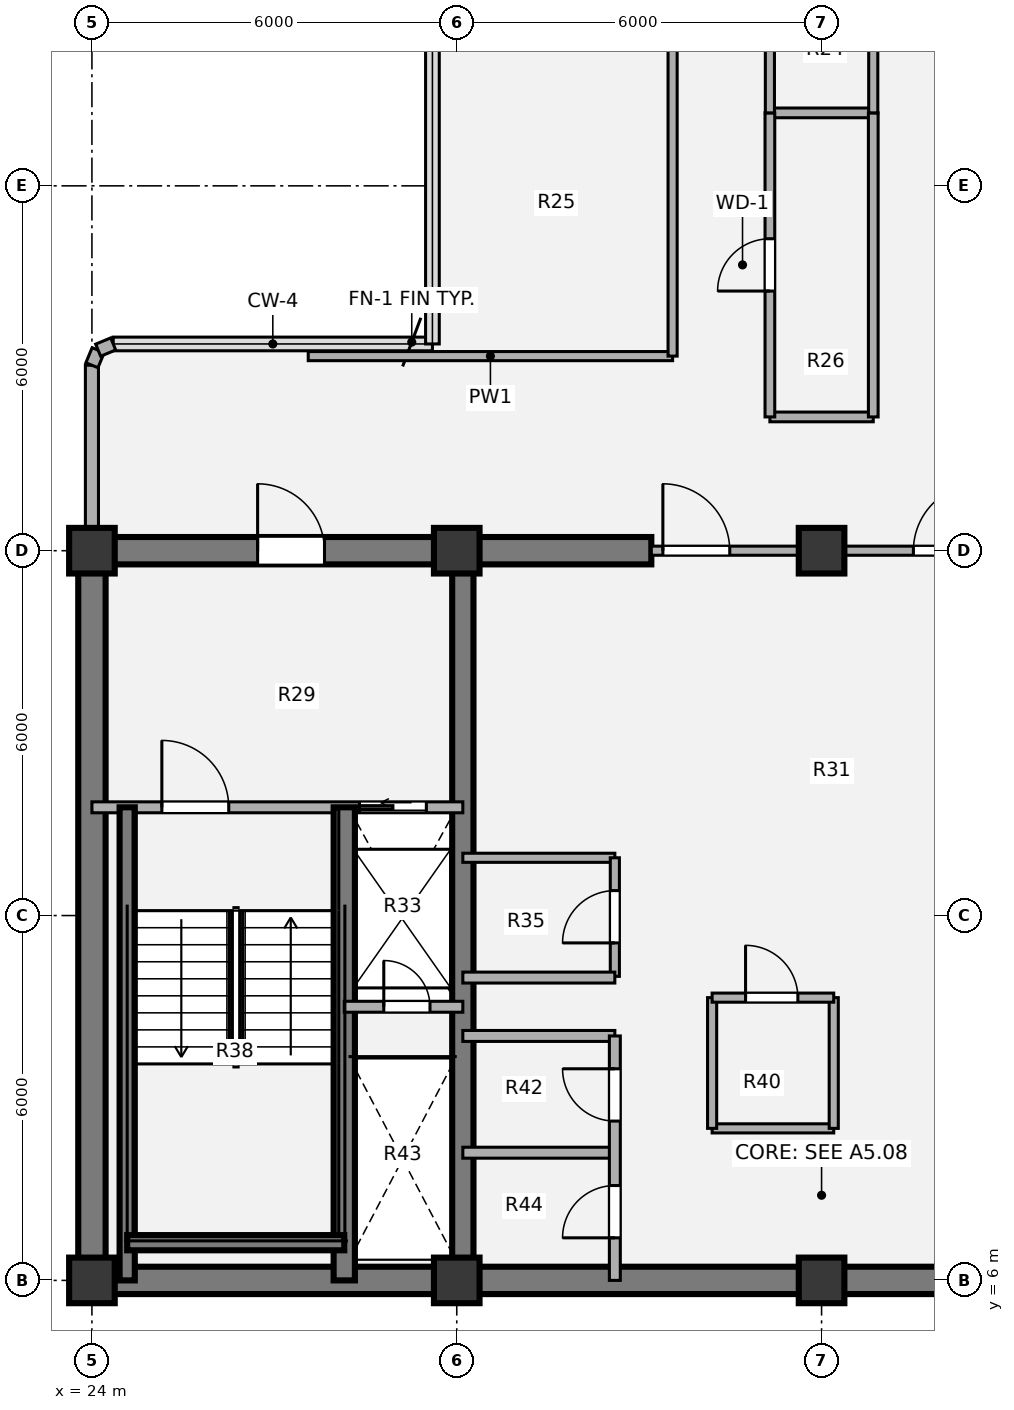
"""IFC4 building model, lengths in metres.
Left out: names, types, materials, properties, quantities, classifications, styles, units other than length and angle.
Written with IfcOpenShell. Run it as: python <this file> out.ifc"""

import sys

from ifc_helpers import new_model, si_unit, direction, frame, frame_2d, origin, origin_2d, place, context, subcontext, project, spatial, rectangle, extrude, source, transform, mapped, element, fill, save


model = new_model("IFC4")
c1 = context("Model", 3, precision=1e-05, world=origin(), true_north=direction((0.0, 1.0)))
c2 = subcontext(c1, "Body", "Model", "MODEL_VIEW")
j1 = project(units=[si_unit("LENGTHUNIT", "METRE"), si_unit("PLANEANGLEUNIT", "RADIAN")], contexts=[c1])
p1 = place(None, origin())
s1 = spatial("IfcSite", under=j1, at=p1, CompositionType="ELEMENT")
p2 = place(p1, origin())
s2 = spatial("IfcBuilding", under=s1, at=p2, CompositionType="ELEMENT")
p3 = place(p2, frame((0.0, 0.0, 194.22)))
s3 = spatial("IfcBuildingStorey", under=s2, at=p3, CompositionType="ELEMENT", Elevation=194.22)
m1 = source(origin(), c2, "Body", "SweptSolid", [
    extrude(rectangle(XDim=0.75, YDim=0.75, at=origin_2d()), origin(), (0.0, 0.0, 1.0), 3.78),
])
for number, where, z_axis, x_axis in (
    (1, (24.0, 6.0, 0.0), (0.0, 0.0, 1.0), (1.0, 0.0, 0.0)),
    (2, (30.0, 6.0, 0.0), (0.0, 0.0, 1.0), (1.0, 0.0, 0.0)),
    (3, (36.0, 6.0, 0.0), (0.0, 0.0, 1.0), (1.0, 0.0, 0.0)),
    (4, (24.0, 18.0, 0.0), (0.0, 0.0, 1.0), (1.0, 0.0, 0.0)),
    (5, (30.0, 18.0, 0.0), (0.0, 0.0, 1.0), (1.0, 0.0, 0.0)),
    (6, (36.0, 18.0, 0.0), (0.0, 0.0, 1.0), (1.0, 0.0, 0.0)),
):
    element("IfcColumn", number, at=place(p3, frame(where, z_axis=z_axis, x_axis=x_axis)), inside=s3, PredefinedType="COLUMN", context=c2, shape_type="MappedRepresentation", body=[
        mapped(m1, transform((0.0, 0.0, 0.0), x_axis=(1.0, 0.0, 0.0), y_axis=(0.0, 1.0, 0.0), z_axis=(0.0, 0.0, 1.0), scale=1.0)),
    ])
p4 = place(p3, frame((48.225, 6.0, 0.0), z_axis=(0.0, 0.0, 1.0), x_axis=(-1.0, 0.0, 0.0)))
e7 = element("IfcWall", 7, at=p4, inside=s3, PredefinedType="SHEAR", context=c2, shape_type="SweptSolid", body=[
    extrude(rectangle(XDim=24.45, YDim=0.45, at=frame_2d((12.225, 0.0))), origin(), (0.0, 0.0, 1.0), 3.78),
])
p5 = place(p3, frame((24.0, 6.0, 0.0), z_axis=(0.0, 0.0, 1.0), x_axis=(0.0, 1.0, 0.0)))
e8 = element("IfcWall", 8, at=p5, inside=s3, PredefinedType="SHEAR", context=c2, shape_type="SweptSolid", body=[
    extrude(rectangle(XDim=12.0, YDim=0.45, at=frame_2d((6.0, 0.0))), origin(), (0.0, 0.0, 1.0), 3.78),
])
p6 = place(p3, frame((23.775, 18.0, 0.0), z_axis=(0.0, 0.0, 1.0), x_axis=(1.0, 0.0, 0.0)))
e9 = element("IfcWall", 9, at=p6, inside=s3, PredefinedType="SHEAR", context=c2, shape_type="SweptSolid", body=[
    extrude(rectangle(XDim=9.425, YDim=0.45, at=frame_2d((4.712, 0.0))), origin(), (0.0, 0.0, 1.0), 3.78),
])
p7 = place(p6, frame((2.95, 0.0, 0.0)))
e10 = element("IfcOpeningElement", 10, at=p7, cuts=e9, PredefinedType="OPENING", context=c2, shape_type="SweptSolid", body=[
    extrude(rectangle(XDim=1.1, YDim=2.1, at=origin_2d()), frame((0.55, 0.235, 1.05), z_axis=(0.0, -1.0, 0.0), x_axis=(1.0, 0.0, 0.0)), (0.0, 0.0, 1.0), 0.47),
])
p8 = place(p3, frame((30.1, 6.0, 0.0), z_axis=(0.0, 0.0, 1.0), x_axis=(0.0, 1.0, 0.0)))
e11 = element("IfcWall", 11, at=p8, inside=s3, PredefinedType="SHEAR", context=c2, shape_type="SweptSolid", body=[
    extrude(rectangle(XDim=12.0, YDim=0.35, at=frame_2d((6.0, 0.0))), origin(), (0.0, 0.0, 1.0), 3.78),
])
p9 = place(p3, frame((24.0, 18.355, 0.0), z_axis=(0.0, 0.0, 1.0), x_axis=(0.0, 1.0, 0.0)))
e12 = element("IfcWall", 12, at=p9, inside=s3, PredefinedType="SOLIDWALL", context=c2, shape_type="SweptSolid", body=[
    extrude(rectangle(XDim=2.695, YDim=0.215, at=frame_2d((1.348, 0.0))), origin(), (0.0, 0.0, 1.0), 2.718),
])
p10 = place(p3, frame((24.0, 21.05, 0.0), z_axis=(0.0, 0.0, 1.0), x_axis=(0.382673670509, 0.923883575944, 0.0)))
e13 = element("IfcWall", 13, at=p10, inside=s3, PredefinedType="SOLIDWALL", context=c2, shape_type="SweptSolid", body=[
    extrude(rectangle(XDim=0.268, YDim=0.215, at=frame_2d((0.134, 0.0))), origin(), (0.0, 0.0, 1.0), 3.53),
])
p11 = place(p3, frame((24.103, 21.298, 0.0), z_axis=(0.0, 0.0, 1.0), x_axis=(0.924205486139, 0.381895560841, 0.0)))
e14 = element("IfcWall", 14, at=p11, inside=s3, PredefinedType="SOLIDWALL", context=c2, shape_type="SweptSolid", body=[
    extrude(rectangle(XDim=0.268, YDim=0.215, at=frame_2d((0.134, 0.0))), origin(), (0.0, 0.0, 1.0), 3.53),
])
p12 = place(p3, frame((30.1, 12.95, 0.0), z_axis=(0.0, 0.0, 1.0), x_axis=(1.0, 0.0, 0.0)))
e15 = element("IfcWall", 15, at=p12, inside=s3, PredefinedType="PARTITIONING", context=c2, shape_type="SweptSolid", body=[
    extrude(rectangle(XDim=2.5, YDim=0.15, at=frame_2d((1.25, 0.0))), origin(), (0.0, 0.0, 1.0), 3.5),
])
p13 = place(p3, frame((32.6, 11.0, 0.0), z_axis=(0.0, 0.0, 1.0), x_axis=(0.0, 1.0, 0.0)))
e16 = element("IfcWall", 16, at=p13, inside=s3, PredefinedType="PARTITIONING", context=c2, shape_type="SweptSolid", body=[
    extrude(rectangle(XDim=1.95, YDim=0.15, at=frame_2d((0.975, 0.0))), origin(), (0.0, 0.0, 1.0), 3.5),
])
p14 = place(p13, frame((0.55, 0.0, 0.0)))
e17 = element("IfcOpeningElement", 17, at=p14, cuts=e16, PredefinedType="OPENING", context=c2, shape_type="SweptSolid", body=[
    extrude(rectangle(XDim=0.86, YDim=2.1, at=origin_2d()), frame((0.43, 0.085, 1.05), z_axis=(0.0, -1.0, 0.0), x_axis=(1.0, 0.0, 0.0)), (0.0, 0.0, 1.0), 0.17),
])
p15 = place(p3, frame((34.2, 8.5, 0.0), z_axis=(0.0, 0.0, 1.0), x_axis=(1.0, 0.0, 0.0)))
e18 = element("IfcWall", 18, at=p15, inside=s3, PredefinedType="PARTITIONING", context=c2, shape_type="SweptSolid", body=[
    extrude(rectangle(XDim=2.0, YDim=0.15, at=frame_2d((1.0, 0.0))), origin(), (0.0, 0.0, 1.0), 3.5),
])
p16 = place(p3, frame((34.2, 8.5, 0.0), z_axis=(0.0, 0.0, 1.0), x_axis=(0.0, 1.0, 0.0)))
e19 = element("IfcWall", 19, at=p16, inside=s3, PredefinedType="PARTITIONING", context=c2, shape_type="SweptSolid", body=[
    extrude(rectangle(XDim=2.15, YDim=0.15, at=frame_2d((1.075, 0.0))), origin(), (0.0, 0.0, 1.0), 3.5),
])
p17 = place(p3, frame((36.2, 8.5, 0.0), z_axis=(0.0, 0.0, 1.0), x_axis=(0.0, 1.0, 0.0)))
e20 = element("IfcWall", 20, at=p17, inside=s3, PredefinedType="PARTITIONING", context=c2, shape_type="SweptSolid", body=[
    extrude(rectangle(XDim=2.15, YDim=0.15, at=frame_2d((1.075, 0.0))), origin(), (0.0, 0.0, 1.0), 2.715),
])
p18 = place(p3, frame((34.2, 10.65, 0.0), z_axis=(0.0, 0.0, 1.0), x_axis=(1.0, 0.0, 0.0)))
e21 = element("IfcWall", 21, at=p18, inside=s3, PredefinedType="PARTITIONING", context=c2, shape_type="SweptSolid", body=[
    extrude(rectangle(XDim=2.0, YDim=0.15, at=frame_2d((1.0, 0.0))), origin(), (0.0, 0.0, 1.0), 3.5),
])
p19 = place(p18, frame((0.55, 0.0, 0.0)))
e22 = element("IfcOpeningElement", 22, at=p19, cuts=e21, PredefinedType="OPENING", context=c2, shape_type="SweptSolid", body=[
    extrude(rectangle(XDim=0.86, YDim=2.1, at=origin_2d()), frame((0.43, 0.085, 1.05), z_axis=(0.0, -1.0, 0.0), x_axis=(1.0, 0.0, 0.0)), (0.0, 0.0, 1.0), 0.17),
])
for number, where, z_axis, x_axis in (
    (23, (30.1, 10.98, 0.0), (0.0, 0.0, 1.0), (1.0, 0.0, 0.0)),
    (24, (30.1, 8.1, 0.0), (0.0, 0.0, 1.0), (1.0, 0.0, 0.0)),
    (25, (30.1, 10.02, 0.0), (0.0, 0.0, 1.0), (1.0, 0.0, 0.0)),
):
    element("IfcWall", number, at=place(p3, frame(where, z_axis=z_axis, x_axis=x_axis)), inside=s3, PredefinedType="PARTITIONING", context=c2, shape_type="SweptSolid", body=[
        extrude(rectangle(XDim=2.5, YDim=0.18, at=frame_2d((1.25, 0.0))), origin(), (0.0, 0.0, 1.0), 3.5),
    ])
p20 = place(p3, frame((32.6, 6.0, 0.0), z_axis=(0.0, 0.0, 1.0), x_axis=(0.0, 1.0, 0.0)))
e26 = element("IfcWall", 26, at=p20, inside=s3, PredefinedType="PARTITIONING", context=c2, shape_type="SweptSolid", body=[
    extrude(rectangle(XDim=4.02, YDim=0.18, at=frame_2d((2.01, 0.0))), origin(), (0.0, 0.0, 1.0), 3.5),
])
p21 = place(p20, frame((0.7, 0.0, 0.0)))
e27 = element("IfcOpeningElement", 27, at=p21, cuts=e26, PredefinedType="OPENING", context=c2, shape_type="SweptSolid", body=[
    extrude(rectangle(XDim=0.86, YDim=2.1, at=origin_2d()), frame((0.43, 0.1, 1.05), z_axis=(0.0, -1.0, 0.0), x_axis=(1.0, 0.0, 0.0)), (0.0, 0.0, 1.0), 0.2),
])
p22 = place(p20, frame((2.62, 0.0, 0.0)))
e28 = element("IfcOpeningElement", 28, at=p22, cuts=e26, PredefinedType="OPENING", context=c2, shape_type="SweptSolid", body=[
    extrude(rectangle(XDim=0.86, YDim=2.1, at=origin_2d()), frame((0.43, 0.1, 1.05), z_axis=(0.0, -1.0, 0.0), x_axis=(1.0, 0.0, 0.0)), (0.0, 0.0, 1.0), 0.2),
])
p23 = place(p3, frame((33.2, 18.0, 0.0), z_axis=(0.0, 0.0, 1.0), x_axis=(1.0, 0.0, 0.0)))
e29 = element("IfcWall", 29, at=p23, inside=s3, PredefinedType="PARTITIONING", context=c2, shape_type="SweptSolid", body=[
    extrude(rectangle(XDim=5.6, YDim=0.15, at=frame_2d((2.8, 0.0))), origin(), (0.0, 0.0, 1.0), 2.515),
])
p24 = place(p23, frame((0.19, 0.0, 0.0)))
e30 = element("IfcOpeningElement", 30, at=p24, cuts=e29, PredefinedType="OPENING", context=c2, shape_type="SweptSolid", body=[
    extrude(rectangle(XDim=1.1, YDim=2.1, at=origin_2d()), frame((0.55, 0.085, 1.05), z_axis=(0.0, -1.0, 0.0), x_axis=(1.0, 0.0, 0.0)), (0.0, 0.0, 1.0), 0.17),
])
p25 = place(p23, frame((4.31, 0.0, 0.0)))
e31 = element("IfcOpeningElement", 31, at=p25, cuts=e29, PredefinedType="OPENING", context=c2, shape_type="SweptSolid", body=[
    extrude(rectangle(XDim=1.1, YDim=2.1, at=origin_2d()), frame((0.55, 0.085, 1.05), z_axis=(0.0, -1.0, 0.0), x_axis=(1.0, 0.0, 0.0)), (0.0, 0.0, 1.0), 0.17),
])
p26 = place(p3, frame((24.0, 13.78, 0.0), z_axis=(0.0, 0.0, 1.0), x_axis=(1.0, 0.0, 0.0)))
e32 = element("IfcWall", 32, at=p26, inside=s3, PredefinedType="PARTITIONING", context=c2, shape_type="SweptSolid", body=[
    extrude(rectangle(XDim=6.1, YDim=0.18, at=frame_2d((3.05, 0.0))), origin(), (0.0, 0.0, 1.0), 3.5),
])
p27 = place(p26, frame((1.15, 0.0, 0.0)))
e33 = element("IfcOpeningElement", 33, at=p27, cuts=e32, PredefinedType="OPENING", context=c2, shape_type="SweptSolid", body=[
    extrude(rectangle(XDim=1.1, YDim=2.1, at=origin_2d()), frame((0.55, 0.1, 1.05), z_axis=(0.0, -1.0, 0.0), x_axis=(1.0, 0.0, 0.0)), (0.0, 0.0, 1.0), 0.2),
])
p28 = place(p26, frame((4.4, 0.0, 0.0)))
e34 = element("IfcOpeningElement", 34, at=p28, cuts=e32, PredefinedType="OPENING", context=c2, shape_type="SweptSolid", body=[
    extrude(rectangle(XDim=1.1, YDim=2.1, at=origin_2d()), frame((0.55, 0.1, 1.05), z_axis=(0.0, -1.0, 0.0), x_axis=(1.0, 0.0, 0.0)), (0.0, 0.0, 1.0), 0.2),
])
p29 = place(p3, frame((28.15, 6.0, 0.0), z_axis=(0.0, 0.0, 1.0), x_axis=(0.0, 1.0, 0.0)))
e35 = element("IfcWall", 35, at=p29, inside=s3, PredefinedType="SHEAR", context=c2, shape_type="SweptSolid", body=[
    extrude(rectangle(XDim=7.78, YDim=0.35, at=frame_2d((3.89, 0.0))), origin(), (0.0, 0.0, 1.0), 3.85),
])
p30 = place(p3, frame((24.58, 6.0, 0.0), z_axis=(0.0, 0.0, 1.0), x_axis=(0.0, 1.0, 0.0)))
e36 = element("IfcWall", 36, at=p30, inside=s3, PredefinedType="SHEAR", context=c2, shape_type="SweptSolid", body=[
    extrude(rectangle(XDim=7.78, YDim=0.25, at=frame_2d((3.89, 0.0))), origin(), (0.0, 0.0, 1.0), 3.85),
])
p31 = place(p3, frame((24.58, 6.62, 0.0), z_axis=(0.0, 0.0, 1.0), x_axis=(1.0, 0.0, 0.0)))
e37 = element("IfcWall", 37, at=p31, inside=s3, PredefinedType="SHEAR", context=c2, shape_type="SweptSolid", body=[
    extrude(rectangle(XDim=3.57, YDim=0.25, at=frame_2d((1.785, 0.0))), origin(), (0.0, 0.0, 1.0), 3.85),
])
p32 = place(p3, frame((28.15, 10.5, 0.0), z_axis=(0.0, 0.0, 1.0), x_axis=(1.0, 0.0, 0.0)))
e38 = element("IfcWall", 38, at=p32, inside=s3, PredefinedType="PARTITIONING", context=c2, shape_type="SweptSolid", body=[
    extrude(rectangle(XDim=1.95, YDim=0.18, at=frame_2d((0.975, 0.0))), origin(), (0.0, 0.0, 1.0), 3.5),
])
p33 = place(p32, frame((0.65, 0.0, 0.0)))
e39 = element("IfcOpeningElement", 39, at=p33, cuts=e38, PredefinedType="OPENING", context=c2, shape_type="SweptSolid", body=[
    extrude(rectangle(XDim=0.76, YDim=2.05, at=origin_2d()), frame((0.38, 0.1, 1.025), z_axis=(0.0, -1.0, 0.0), x_axis=(1.0, 0.0, 0.0)), (0.0, 0.0, 1.0), 0.2),
])
p34 = place(p3, frame((35.15, 20.2, 0.0), z_axis=(0.0, 0.0, 1.0), x_axis=(1.0, 0.0, 0.0)))
e40 = element("IfcWall", 40, at=p34, inside=s3, PredefinedType="PLUMBINGWALL", context=c2, shape_type="SweptSolid", body=[
    extrude(rectangle(XDim=1.7, YDim=0.16, at=frame_2d((0.85, 0.0))), origin(), (0.0, 0.0, 1.0), 3.5),
])
p35 = place(p3, frame((27.558, 21.2, 0.0), z_axis=(0.0, 0.0, 1.0), x_axis=(1.0, 0.0, 0.0)))
e41 = element("IfcWall", 41, at=p35, inside=s3, PredefinedType="PARTITIONING", context=c2, shape_type="SweptSolid", body=[
    extrude(rectangle(XDim=5.992, YDim=0.15, at=frame_2d((2.996, 0.0))), origin(), (0.0, 0.0, 1.0), 3.5),
])
p36 = place(p3, frame((35.15, 25.2, 0.0), z_axis=(0.0, 0.0, 1.0), x_axis=(1.0, 0.0, 0.0)))
e42 = element("IfcWall", 42, at=p36, inside=s3, PredefinedType="PLUMBINGWALL", context=c2, shape_type="SweptSolid", body=[
    extrude(rectangle(XDim=1.7, YDim=0.16, at=frame_2d((0.85, 0.0))), origin(), (0.0, 0.0, 1.0), 3.5),
])
p37 = place(p3, frame((33.55, 21.2, 0.0), z_axis=(0.0, 0.0, 1.0), x_axis=(0.0, 1.0, 0.0)))
e43 = element("IfcWall", 43, at=p37, inside=s3, PredefinedType="PARTITIONING", context=c2, shape_type="SweptSolid", body=[
    extrude(rectangle(XDim=11.4, YDim=0.15, at=frame_2d((5.7, 0.0))), origin(), (0.0, 0.0, 1.0), 3.5),
])
p38 = place(p37, frame((5.14, 0.0, 0.0)))
e44 = element("IfcOpeningElement", 44, at=p38, cuts=e43, PredefinedType="OPENING", context=c2, shape_type="SweptSolid", body=[
    extrude(rectangle(XDim=0.86, YDim=2.1, at=origin_2d()), frame((0.43, 0.085, 1.05), z_axis=(0.0, -1.0, 0.0), x_axis=(1.0, 0.0, 0.0)), (0.0, 0.0, 1.0), 0.17),
])
p39 = place(p3, frame((35.15, 20.2, 0.0), z_axis=(0.0, 0.0, 1.0), x_axis=(0.0, 1.0, 0.0)))
e45 = element("IfcWall", 45, at=p39, inside=s3, PredefinedType="PLUMBINGWALL", context=c2, shape_type="SweptSolid", body=[
    extrude(rectangle(XDim=5.0, YDim=0.16, at=frame_2d((2.5, 0.0))), origin(), (0.0, 0.0, 1.0), 3.5),
])
p40 = place(p39, frame((2.07, 0.0, 0.0)))
e46 = element("IfcOpeningElement", 46, at=p40, cuts=e45, PredefinedType="OPENING", context=c2, shape_type="SweptSolid", body=[
    extrude(rectangle(XDim=0.86, YDim=2.1, at=origin_2d()), frame((0.43, 0.09, 1.05), z_axis=(0.0, -1.0, 0.0), x_axis=(1.0, 0.0, 0.0)), (0.0, 0.0, 1.0), 0.18),
])
p41 = place(p3, frame((35.15, 25.2, 0.0), z_axis=(0.0, 0.0, 1.0), x_axis=(0.0, 1.0, 0.0)))
e47 = element("IfcWall", 47, at=p41, inside=s3, PredefinedType="PARTITIONING", context=c2, shape_type="SweptSolid", body=[
    extrude(rectangle(XDim=15.46, YDim=0.15, at=frame_2d((7.73, 0.0))), origin(), (0.0, 0.0, 1.0), 3.5),
])
p42 = place(p3, frame((36.85, 20.2, 0.0), z_axis=(0.0, 0.0, 1.0), x_axis=(0.0, 1.0, 0.0)))
e48 = element("IfcWall", 48, at=p42, inside=s3, PredefinedType="PLUMBINGWALL", context=c2, shape_type="SweptSolid", body=[
    extrude(rectangle(XDim=5.0, YDim=0.16, at=frame_2d((2.5, 0.0))), origin(), (0.0, 0.0, 1.0), 3.5),
])
p43 = place(p3, frame((36.85, 25.2, 0.0), z_axis=(0.0, 0.0, 1.0), x_axis=(0.0, 1.0, 0.0)))
e49 = element("IfcWall", 49, at=p43, inside=s3, PredefinedType="PARTITIONING", context=c2, shape_type="SweptSolid", body=[
    extrude(rectangle(XDim=15.46, YDim=0.15, at=frame_2d((7.73, 0.0))), origin(), (0.0, 0.0, 1.0), 3.5),
])
p44 = place(p43, frame((7.205, 0.0, 0.0)))
e50 = element("IfcOpeningElement", 50, at=p44, cuts=e49, PredefinedType="OPENING", context=c2, shape_type="SweptSolid", body=[
    extrude(rectangle(XDim=1.05, YDim=2.1, at=origin_2d()), frame((0.525, 0.085, 1.05), z_axis=(0.0, -1.0, 0.0), x_axis=(1.0, 0.0, 0.0)), (0.0, 0.0, 1.0), 0.17),
])
m2 = source(origin(), c2, "Body", "SweptSolid", [
    extrude(rectangle(XDim=0.86, YDim=2.1, at=origin_2d()), frame((0.43, 0.025, 1.05), z_axis=(0.0, -1.0, 0.0), x_axis=(1.0, 0.0, 0.0)), (0.0, 0.0, 1.0), 0.05),
])
p45 = place(p14, origin())
e51 = element("IfcDoor", 51, at=p45, inside=s3, OperationType="SINGLE_SWING_LEFT", PredefinedType="DOOR", context=c2, shape_type="MappedRepresentation", body=[
    mapped(m2, transform((0.0, 0.0, 0.0), x_axis=(1.0, 0.0, 0.0), y_axis=(0.0, 1.0, 0.0), z_axis=(0.0, 0.0, 1.0), scale=1.0)),
])
fill(e17, e51)
p46 = place(p19, origin())
e52 = element("IfcDoor", 52, at=p46, inside=s3, OperationType="SINGLE_SWING_LEFT", PredefinedType="DOOR", context=c2, shape_type="MappedRepresentation", body=[
    mapped(m2, transform((0.0, 0.0, 0.0), x_axis=(1.0, 0.0, 0.0), y_axis=(0.0, 1.0, 0.0), z_axis=(0.0, 0.0, 1.0), scale=1.0)),
])
fill(e22, e52)
p47 = place(p21, origin())
e53 = element("IfcDoor", 53, at=p47, inside=s3, OperationType="SINGLE_SWING_LEFT", PredefinedType="DOOR", context=c2, shape_type="MappedRepresentation", body=[
    mapped(m2, transform((0.0, 0.0, 0.0), x_axis=(1.0, 0.0, 0.0), y_axis=(0.0, 1.0, 0.0), z_axis=(0.0, 0.0, 1.0), scale=1.0)),
])
fill(e27, e53)
p48 = place(p22, origin())
e54 = element("IfcDoor", 54, at=p48, inside=s3, OperationType="SINGLE_SWING_RIGHT", PredefinedType="DOOR", context=c2, shape_type="MappedRepresentation", body=[
    mapped(m2, transform((0.0, 0.0, 0.0), x_axis=(1.0, 0.0, 0.0), y_axis=(0.0, 1.0, 0.0), z_axis=(0.0, 0.0, 1.0), scale=1.0)),
])
fill(e28, e54)
m3 = source(origin(), c2, "Body", "SweptSolid", [
    extrude(rectangle(XDim=1.1, YDim=2.1, at=origin_2d()), frame((0.55, 0.025, 1.05), z_axis=(0.0, -1.0, 0.0), x_axis=(1.0, 0.0, 0.0)), (0.0, 0.0, 1.0), 0.05),
])
p49 = place(p24, origin())
e55 = element("IfcDoor", 55, at=p49, inside=s3, OperationType="SINGLE_SWING_LEFT", PredefinedType="DOOR", context=c2, shape_type="MappedRepresentation", body=[
    mapped(m3, transform((0.0, 0.0, 0.0), x_axis=(1.0, 0.0, 0.0), y_axis=(0.0, 1.0, 0.0), z_axis=(0.0, 0.0, 1.0), scale=1.0)),
])
fill(e30, e55)
p50 = place(p25, origin())
e56 = element("IfcDoor", 56, at=p50, inside=s3, OperationType="SINGLE_SWING_RIGHT", PredefinedType="DOOR", context=c2, shape_type="MappedRepresentation", body=[
    mapped(m3, transform((0.0, 0.0, 0.0), x_axis=(1.0, 0.0, 0.0), y_axis=(0.0, 1.0, 0.0), z_axis=(0.0, 0.0, 1.0), scale=1.0)),
])
fill(e31, e56)
m4 = source(origin(), c2, "Body", "SweptSolid", [
    extrude(rectangle(XDim=1.1, YDim=2.1, at=origin_2d()), frame((0.55, 0.025, 1.05), z_axis=(0.0, -1.0, 0.0), x_axis=(1.0, 0.0, 0.0)), (0.0, 0.0, 1.0), 0.05),
])
p51 = place(p27, origin())
e57 = element("IfcDoor", 57, at=p51, inside=s3, OperationType="SINGLE_SWING_LEFT", PredefinedType="DOOR", context=c2, shape_type="MappedRepresentation", body=[
    mapped(m4, transform((0.0, 0.0, 0.0), x_axis=(1.0, 0.0, 0.0), y_axis=(0.0, 1.0, 0.0), z_axis=(0.0, 0.0, 1.0), scale=1.0)),
])
fill(e33, e57)
m5 = source(origin(), c2, "Body", "SweptSolid", [
    extrude(rectangle(XDim=1.1, YDim=2.1, at=origin_2d()), frame((0.55, 0.025, 1.05), z_axis=(0.0, -1.0, 0.0), x_axis=(1.0, 0.0, 0.0)), (0.0, 0.0, 1.0), 0.05),
])
p52 = place(p28, origin())
e58 = element("IfcDoor", 58, at=p52, inside=s3, OperationType="SLIDING_TO_LEFT", PredefinedType="DOOR", context=c2, shape_type="MappedRepresentation", body=[
    mapped(m5, transform((0.0, 0.0, 0.0), x_axis=(1.0, 0.0, 0.0), y_axis=(0.0, 1.0, 0.0), z_axis=(0.0, 0.0, 1.0), scale=1.0)),
])
fill(e34, e58)
m6 = source(origin(), c2, "Body", "SweptSolid", [
    extrude(rectangle(XDim=0.76, YDim=2.05, at=origin_2d()), frame((0.38, 0.025, 1.025), z_axis=(0.0, -1.0, 0.0), x_axis=(1.0, 0.0, 0.0)), (0.0, 0.0, 1.0), 0.05),
])
p53 = place(p33, origin())
e59 = element("IfcDoor", 59, at=p53, inside=s3, OperationType="SINGLE_SWING_LEFT", PredefinedType="DOOR", context=c2, shape_type="MappedRepresentation", body=[
    mapped(m6, transform((0.0, 0.0, 0.0), x_axis=(1.0, 0.0, 0.0), y_axis=(0.0, 1.0, 0.0), z_axis=(0.0, 0.0, 1.0), scale=1.0)),
])
fill(e39, e59)
p54 = place(p7, origin())
e60 = element("IfcDoor", 60, at=p54, inside=s3, OperationType="SINGLE_SWING_LEFT", PredefinedType="DOOR", context=c2, shape_type="MappedRepresentation", body=[
    mapped(m3, transform((0.0, 0.0, 0.0), x_axis=(1.0, 0.0, 0.0), y_axis=(0.0, 1.0, 0.0), z_axis=(0.0, 0.0, 1.0), scale=1.0)),
])
fill(e10, e60)
m7 = source(origin(), c2, "Body", "SweptSolid", [
    extrude(rectangle(XDim=0.86, YDim=2.1, at=origin_2d()), frame((0.43, 0.025, 1.05), z_axis=(0.0, -1.0, 0.0), x_axis=(1.0, 0.0, 0.0)), (0.0, 0.0, 1.0), 0.05),
])
p55 = place(p40, origin())
e61 = element("IfcDoor", 61, at=p55, inside=s3, OperationType="SINGLE_SWING_LEFT", PredefinedType="DOOR", context=c2, shape_type="MappedRepresentation", body=[
    mapped(m7, transform((0.0, 0.0, 0.0), x_axis=(1.0, 0.0, 0.0), y_axis=(0.0, 1.0, 0.0), z_axis=(0.0, 0.0, 1.0), scale=1.0)),
])
fill(e46, e61)
save(model, sys.argv[1])
